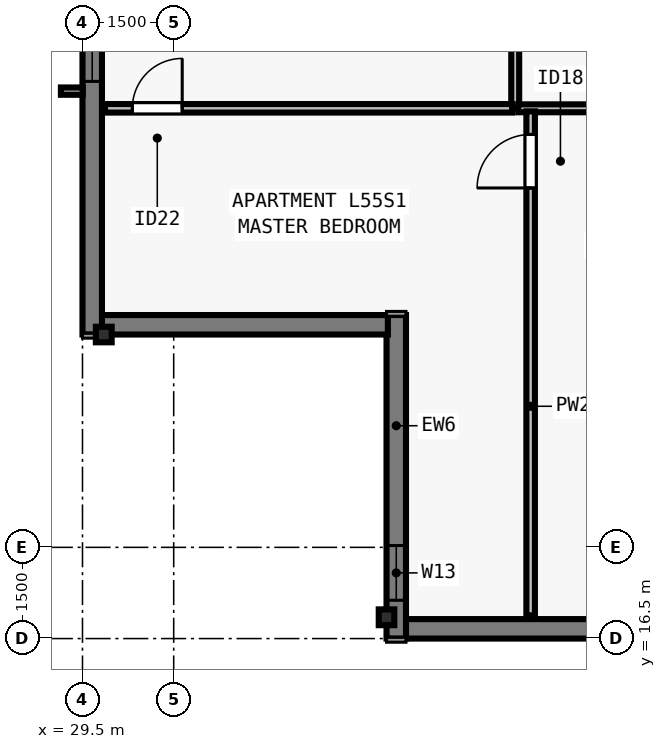
"""IFC4 building model, lengths in metres.
Left out: names, types, materials, properties, quantities, classifications, styles, units other than length and angle.
Written with IfcOpenShell. Run it as: python <this file> out.ifc"""

import sys

from ifc_helpers import new_model, si_unit, direction, frame, frame_2d, origin, origin_2d, place, context, subcontext, project, spatial, rectangle, i_section, extrude, element, fill, save


model = new_model("IFC4")
c1 = context("Model", 3, precision=1e-05, world=origin(), true_north=direction((0.0, 1.0)))
c2 = subcontext(c1, "Body", "Model", "MODEL_VIEW")
j1 = project(units=[si_unit("LENGTHUNIT", "METRE"), si_unit("PLANEANGLEUNIT", "RADIAN")], contexts=[c1])
p1 = place(None, origin())
s1 = spatial("IfcSite", under=j1, at=p1, CompositionType="ELEMENT")
p2 = place(p1, origin())
s2 = spatial("IfcBuilding", under=s1, at=p2, CompositionType="ELEMENT")
p3 = place(p2, frame((0.0, 0.0, 202.5)))
s3 = spatial("IfcBuildingStorey", under=s2, at=p3, CompositionType="ELEMENT", Elevation=202.5)
for number, where, z_axis, x_axis in (
    (1, (34.5, 16.85, 0.0), (0.0, 0.0, 1.0), (1.0, 0.0, 0.0)),
    (2, (29.85, 21.5, 0.0), (0.0, 0.0, 1.0), (0.0, 1.0, 0.0)),
):
    element("IfcColumn", number, at=place(p3, frame(where, z_axis=z_axis, x_axis=x_axis)), inside=s3, PredefinedType="COLUMN", context=c2, shape_type="SweptSolid", body=[
        extrude(i_section(OverallWidth=0.256, OverallDepth=0.26, WebThickness=0.01, FlangeThickness=0.017, FilletRadius=0.013, at=origin_2d()), origin(), (0.0, 0.0, 1.0), 3.5),
    ])
p4 = place(p3, frame((69.5, 16.66, 0.0), z_axis=(0.0, 0.0, 1.0), x_axis=(-1.0, 0.0, 0.0)))
e3 = element("IfcWall", 3, at=p4, inside=s3, PredefinedType="SOLIDWALL", context=c2, shape_type="SweptSolid", body=[
    extrude(rectangle(XDim=34.702, YDim=0.32, at=frame_2d((17.351, 0.0))), origin(), (0.0, 0.0, 1.0), 3.29),
])
p5 = place(p4, frame((5.863, 0.0, 0.8)))
e4 = element("IfcOpeningElement", 4, at=p5, cuts=e3, PredefinedType="OPENING", context=c2, shape_type="SweptSolid", body=[
    extrude(rectangle(XDim=1.85, YDim=1.678, at=frame_2d((0.925, 0.839))), frame((0.0, 0.17, 0.0), z_axis=(0.0, -1.0, 0.0), x_axis=(1.0, 0.0, 0.0)), (0.0, 0.0, 1.0), 0.34),
])
p6 = place(p4, frame((8.138, 0.0, 0.8)))
e5 = element("IfcOpeningElement", 5, at=p6, cuts=e3, PredefinedType="OPENING", context=c2, shape_type="SweptSolid", body=[
    extrude(rectangle(XDim=1.55, YDim=1.678, at=frame_2d((0.775, 0.839))), frame((0.0, 0.17, 0.0), z_axis=(0.0, -1.0, 0.0), x_axis=(1.0, 0.0, 0.0)), (0.0, 0.0, 1.0), 0.34),
])
p7 = place(p4, frame((10.113, 0.0, 0.8)))
e6 = element("IfcOpeningElement", 6, at=p7, cuts=e3, PredefinedType="OPENING", context=c2, shape_type="SweptSolid", body=[
    extrude(rectangle(XDim=1.85, YDim=1.678, at=frame_2d((0.925, 0.839))), frame((0.0, 0.17, 0.0), z_axis=(0.0, -1.0, 0.0), x_axis=(1.0, 0.0, 0.0)), (0.0, 0.0, 1.0), 0.34),
])
p8 = place(p4, frame((14.888, 0.0, 0.8)))
e7 = element("IfcOpeningElement", 7, at=p8, cuts=e3, PredefinedType="OPENING", context=c2, shape_type="SweptSolid", body=[
    extrude(rectangle(XDim=1.55, YDim=1.678, at=frame_2d((0.775, 0.839))), frame((0.0, 0.17, 0.0), z_axis=(0.0, -1.0, 0.0), x_axis=(1.0, 0.0, 0.0)), (0.0, 0.0, 1.0), 0.34),
])
p9 = place(p4, frame((18.564, 0.0, 0.8)))
e8 = element("IfcOpeningElement", 8, at=p9, cuts=e3, PredefinedType="OPENING", context=c2, shape_type="SweptSolid", body=[
    extrude(rectangle(XDim=1.85, YDim=1.678, at=frame_2d((0.925, 0.839))), frame((0.0, 0.17, 0.0), z_axis=(0.0, -1.0, 0.0), x_axis=(1.0, 0.0, 0.0)), (0.0, 0.0, 1.0), 0.34),
])
p10 = place(p4, frame((24.414, 0.0, 0.8)))
e9 = element("IfcOpeningElement", 9, at=p10, cuts=e3, PredefinedType="OPENING", context=c2, shape_type="SweptSolid", body=[
    extrude(rectangle(XDim=1.85, YDim=1.678, at=frame_2d((0.925, 0.839))), frame((0.0, 0.17, 0.0), z_axis=(0.0, -1.0, 0.0), x_axis=(1.0, 0.0, 0.0)), (0.0, 0.0, 1.0), 0.34),
])
p11 = place(p4, frame((28.389, 0.0, 0.8)))
e10 = element("IfcOpeningElement", 10, at=p11, cuts=e3, PredefinedType="OPENING", context=c2, shape_type="SweptSolid", body=[
    extrude(rectangle(XDim=1.55, YDim=1.678, at=frame_2d((0.775, 0.839))), frame((0.0, 0.17, 0.0), z_axis=(0.0, -1.0, 0.0), x_axis=(1.0, 0.0, 0.0)), (0.0, 0.0, 1.0), 0.34),
])
p12 = place(p3, frame((34.66, 16.5, 0.0), z_axis=(0.0, 0.0, 1.0), x_axis=(0.0, 1.0, 0.0)))
e11 = element("IfcWall", 11, at=p12, inside=s3, PredefinedType="SOLIDWALL", context=c2, shape_type="SweptSolid", body=[
    extrude(rectangle(XDim=5.32, YDim=0.32, at=frame_2d((2.66, 0.0))), origin(), (0.0, 0.0, 1.0), 3.29),
])
p13 = place(p12, frame((0.63, 0.0, 0.8)))
e12 = element("IfcOpeningElement", 12, at=p13, cuts=e11, PredefinedType="OPENING", context=c2, shape_type="SweptSolid", body=[
    extrude(rectangle(XDim=0.9, YDim=1.678, at=frame_2d((0.45, 0.839))), frame((0.0, 0.17, 0.0), z_axis=(0.0, -1.0, 0.0), x_axis=(1.0, 0.0, 0.0)), (0.0, 0.0, 1.0), 0.34),
])
p14 = place(p3, frame((34.522, 21.66, 0.0), z_axis=(0.0, 0.0, 1.0), x_axis=(-1.0, 0.0, 0.0)))
e13 = element("IfcWall", 13, at=p14, inside=s3, PredefinedType="SOLIDWALL", context=c2, shape_type="SweptSolid", body=[
    extrude(rectangle(XDim=4.724, YDim=0.32, at=frame_2d((2.362, 0.0))), origin(), (0.0, 0.0, 1.0), 3.29),
])
p15 = place(p3, frame((29.66, 21.5, 0.0), z_axis=(0.0, 0.0, 1.0), x_axis=(0.0, 1.0, 0.0)))
e14 = element("IfcWall", 14, at=p15, inside=s3, PredefinedType="SOLIDWALL", context=c2, shape_type="SweptSolid", body=[
    extrude(rectangle(XDim=34.702, YDim=0.32, at=frame_2d((17.351, 0.0))), origin(), (0.0, 0.0, 1.0), 3.29),
])
p16 = place(p15, frame((4.163, 0.0, 0.8)))
e15 = element("IfcOpeningElement", 15, at=p16, cuts=e14, PredefinedType="OPENING", context=c2, shape_type="SweptSolid", body=[
    extrude(rectangle(XDim=1.85, YDim=1.678, at=frame_2d((0.925, 0.839))), frame((0.0, 0.17, 0.0), z_axis=(0.0, -1.0, 0.0), x_axis=(1.0, 0.0, 0.0)), (0.0, 0.0, 1.0), 0.34),
])
p17 = place(p15, frame((6.888, 0.0, 0.8)))
e16 = element("IfcOpeningElement", 16, at=p17, cuts=e14, PredefinedType="OPENING", context=c2, shape_type="SweptSolid", body=[
    extrude(rectangle(XDim=1.55, YDim=1.678, at=frame_2d((0.775, 0.839))), frame((0.0, 0.17, 0.0), z_axis=(0.0, -1.0, 0.0), x_axis=(1.0, 0.0, 0.0)), (0.0, 0.0, 1.0), 0.34),
])
p18 = place(p15, frame((10.113, 0.0, 0.8)))
e17 = element("IfcOpeningElement", 17, at=p18, cuts=e14, PredefinedType="OPENING", context=c2, shape_type="SweptSolid", body=[
    extrude(rectangle(XDim=1.85, YDim=1.678, at=frame_2d((0.925, 0.839))), frame((0.0, 0.17, 0.0), z_axis=(0.0, -1.0, 0.0), x_axis=(1.0, 0.0, 0.0)), (0.0, 0.0, 1.0), 0.34),
])
p19 = place(p15, frame((14.888, 0.0, 0.8)))
e18 = element("IfcOpeningElement", 18, at=p19, cuts=e14, PredefinedType="OPENING", context=c2, shape_type="SweptSolid", body=[
    extrude(rectangle(XDim=1.55, YDim=1.678, at=frame_2d((0.775, 0.839))), frame((0.0, 0.17, 0.0), z_axis=(0.0, -1.0, 0.0), x_axis=(1.0, 0.0, 0.0)), (0.0, 0.0, 1.0), 0.34),
])
p20 = place(p15, frame((19.364, 0.0, 0.8)))
e19 = element("IfcOpeningElement", 19, at=p20, cuts=e14, PredefinedType="OPENING", context=c2, shape_type="SweptSolid", body=[
    extrude(rectangle(XDim=1.85, YDim=1.678, at=frame_2d((0.925, 0.839))), frame((0.0, 0.17, 0.0), z_axis=(0.0, -1.0, 0.0), x_axis=(1.0, 0.0, 0.0)), (0.0, 0.0, 1.0), 0.34),
])
p21 = place(p15, frame((23.614, 0.0, 0.8)))
e20 = element("IfcOpeningElement", 20, at=p21, cuts=e14, PredefinedType="OPENING", context=c2, shape_type="SweptSolid", body=[
    extrude(rectangle(XDim=1.85, YDim=1.678, at=frame_2d((0.925, 0.839))), frame((0.0, 0.17, 0.0), z_axis=(0.0, -1.0, 0.0), x_axis=(1.0, 0.0, 0.0)), (0.0, 0.0, 1.0), 0.34),
])
p22 = place(p15, frame((28.839, 0.0, 0.8)))
e21 = element("IfcOpeningElement", 21, at=p22, cuts=e14, PredefinedType="OPENING", context=c2, shape_type="SweptSolid", body=[
    extrude(rectangle(XDim=1.55, YDim=1.678, at=frame_2d((0.775, 0.839))), frame((0.0, 0.17, 0.0), z_axis=(0.0, -1.0, 0.0), x_axis=(1.0, 0.0, 0.0)), (0.0, 0.0, 1.0), 0.34),
])
p23 = place(p3, frame((36.616, 25.22, 0.0), z_axis=(0.0, 0.0, 1.0), x_axis=(0.0, 1.0, 0.0)))
e22 = element("IfcWall", 22, at=p23, inside=s3, PredefinedType="PLUMBINGWALL", context=c2, shape_type="SweptSolid", body=[
    extrude(rectangle(XDim=2.75, YDim=0.13, at=frame_2d((1.375, 0.0))), origin(), (0.0, 0.0, 1.0), 3.29),
])
p24 = place(p3, frame((36.666, 25.22, 0.0), z_axis=(0.0, 0.0, 1.0), x_axis=(1.0, 0.0, 0.0)))
e23 = element("IfcWall", 23, at=p24, inside=s3, PredefinedType="PLUMBINGWALL", context=c2, shape_type="SweptSolid", body=[
    extrude(rectangle(XDim=2.85, YDim=0.13, at=frame_2d((1.425, 0.0))), origin(), (0.0, 0.0, 1.0), 3.29),
])
p25 = place(p3, frame((36.87, 16.88, 0.0), z_axis=(0.0, 0.0, 1.0), x_axis=(0.0, 1.0, 0.0)))
e24 = element("IfcWall", 24, at=p25, inside=s3, PredefinedType="PARTITIONING", context=c2, shape_type="SweptSolid", body=[
    extrude(rectangle(XDim=8.29, YDim=0.14, at=frame_2d((4.145, 0.0))), origin(), (0.0, 0.0, 1.0), 2.573),
])
p26 = place(p25, frame((7.03, 0.0, 0.0)))
e25 = element("IfcOpeningElement", 25, at=p26, cuts=e24, PredefinedType="OPENING", context=c2, shape_type="SweptSolid", body=[
    extrude(rectangle(XDim=0.88, YDim=2.1, at=frame_2d((0.44, 1.05))), frame((0.0, 0.08, 0.0), z_axis=(0.0, -1.0, 0.0), x_axis=(1.0, 0.0, 0.0)), (0.0, 0.0, 1.0), 0.16),
])
p27 = place(p3, frame((29.87, 25.22, 0.0), z_axis=(0.0, 0.0, 1.0), x_axis=(1.0, 0.0, 0.0)))
e26 = element("IfcWall", 26, at=p27, inside=s3, PredefinedType="PARTITIONING", context=c2, shape_type="SweptSolid", body=[
    extrude(rectangle(XDim=6.696, YDim=0.14, at=frame_2d((3.348, 0.0))), origin(), (0.0, 0.0, 1.0), 2.958),
])
p28 = place(p27, frame((0.45, 0.0, 0.0)))
e27 = element("IfcOpeningElement", 27, at=p28, cuts=e26, PredefinedType="OPENING", context=c2, shape_type="SweptSolid", body=[
    extrude(rectangle(XDim=0.82, YDim=2.1, at=frame_2d((0.41, 1.05))), frame((0.0, 0.08, 0.0), z_axis=(0.0, -1.0, 0.0), x_axis=(1.0, 0.0, 0.0)), (0.0, 0.0, 1.0), 0.16),
])
p29 = place(p16, origin())
e28 = element("IfcWindow", 28, at=p29, inside=s3, PartitioningType="SINGLE_PANEL", PredefinedType="WINDOW", context=c2, shape_type="SweptSolid", body=[
    extrude(rectangle(XDim=1.85, YDim=1.678, at=frame_2d((0.925, 0.839))), frame((0.0, -0.05, 0.0), z_axis=(0.0, -1.0, 0.0), x_axis=(1.0, 0.0, 0.0)), (0.0, 0.0, 1.0), 0.06),
])
fill(e15, e28)
p30 = place(p13, origin())
e29 = element("IfcWindow", 29, at=p30, inside=s3, PartitioningType="SINGLE_PANEL", PredefinedType="WINDOW", context=c2, shape_type="SweptSolid", body=[
    extrude(rectangle(XDim=0.9, YDim=1.678, at=frame_2d((0.45, 0.839))), frame((0.0, -0.04, 0.0), z_axis=(0.0, -1.0, 0.0), x_axis=(1.0, 0.0, 0.0)), (0.0, 0.0, 1.0), 0.06),
])
fill(e12, e29)
p31 = place(p28, origin())
e30 = element("IfcDoor", 30, at=p31, inside=s3, OperationType="SINGLE_SWING_RIGHT", PredefinedType="DOOR", context=c2, shape_type="SweptSolid", body=[
    extrude(rectangle(XDim=0.82, YDim=2.1, at=frame_2d((0.41, 1.05))), frame((0.0, 0.025, 0.0), z_axis=(0.0, -1.0, 0.0), x_axis=(1.0, 0.0, 0.0)), (0.0, 0.0, 1.0), 0.05),
])
fill(e27, e30)
p32 = place(p26, origin())
e31 = element("IfcDoor", 31, at=p32, inside=s3, OperationType="SINGLE_SWING_LEFT", PredefinedType="DOOR", context=c2, shape_type="SweptSolid", body=[
    extrude(rectangle(XDim=0.88, YDim=2.1, at=frame_2d((0.44, 1.05))), frame((0.0, 0.025, 0.0), z_axis=(0.0, -1.0, 0.0), x_axis=(1.0, 0.0, 0.0)), (0.0, 0.0, 1.0), 0.05),
])
fill(e25, e31)
save(model, sys.argv[1])
